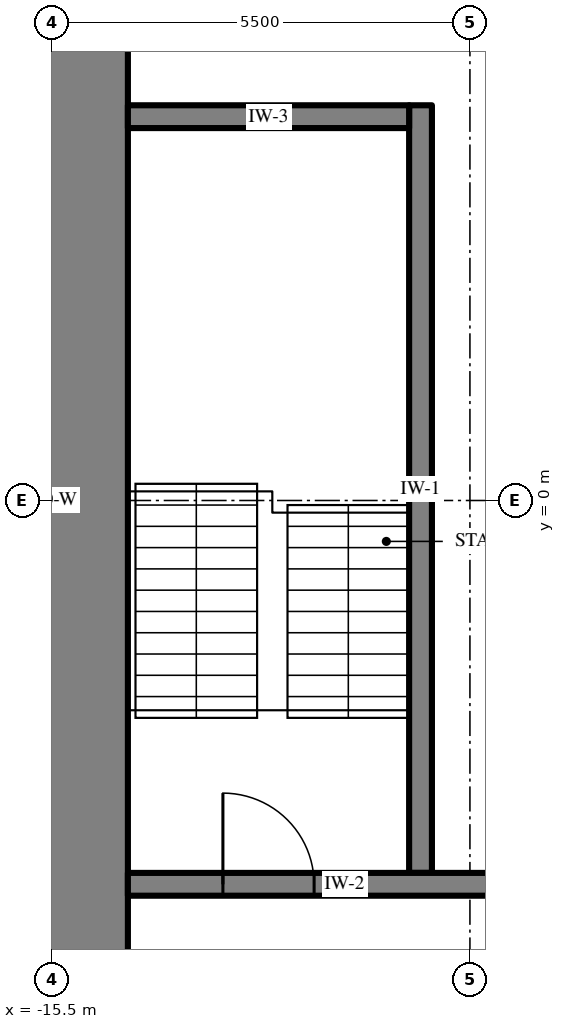
"""IFC4 building model, lengths in metres.
Left out: names, types, materials, properties, quantities, classifications, styles, units other than length and angle.
Written with IfcOpenShell. Run it as: python <this file> out.ifc"""

import sys

from ifc_helpers import new_model, si_unit, direction, frame, frame_2d, origin, place, context, subcontext, project, spatial, rectangle, extrude, element, fill, save


model = new_model("IFC4")
c1 = context("Model", 3, precision=1e-05, world=origin(), true_north=direction((0.0, 1.0)))
c2 = subcontext(c1, "Body", "Model", "MODEL_VIEW")
j1 = project(units=[si_unit("LENGTHUNIT", "METRE"), si_unit("PLANEANGLEUNIT", "RADIAN")], contexts=[c1])
p1 = place(None, origin())
s1 = spatial("IfcSite", under=j1, at=p1, CompositionType="ELEMENT")
p2 = place(p1, origin())
s2 = spatial("IfcBuilding", under=s1, at=p2, CompositionType="ELEMENT")
p3 = place(p2, frame((0.0, 0.0, 21.0)))
s3 = spatial("IfcBuildingStorey", under=s2, at=p3, CompositionType="ELEMENT", Elevation=21.0)
p4 = place(p3, frame((-15.5, -15.5, -0.25), z_axis=(0.0, 0.0, 1.0), x_axis=(0.0, 1.0, 0.0)))
e1 = element("IfcWall", 1, at=p4, inside=s3, PredefinedType="SHEAR", context=c2, shape_type="SweptSolid", body=[
    extrude(rectangle(XDim=31.0, YDim=2.0, at=frame_2d((15.5, 0.0))), origin(), (0.0, 0.0, 1.0), 3.75),
])
p5 = place(p4, frame((6.5, 0.0, 0.25)))
e2 = element("IfcOpeningElement", 2, at=p5, cuts=e1, PredefinedType="OPENING", context=c2, shape_type="SweptSolid", body=[
    extrude(rectangle(XDim=1.2, YDim=2.1, at=frame_2d((0.6, 1.05))), frame((0.0, 1.01, 0.0), z_axis=(0.0, -1.0, 0.0), x_axis=(1.0, 0.0, 0.0)), (0.0, 0.0, 1.0), 2.02),
])
p6 = place(p4, frame((23.0, 0.0, 0.25)))
e3 = element("IfcOpeningElement", 3, at=p6, cuts=e1, PredefinedType="OPENING", context=c2, shape_type="SweptSolid", body=[
    extrude(rectangle(XDim=1.8, YDim=2.1, at=frame_2d((0.9, 1.05))), frame((0.0, 1.01, 0.0), z_axis=(0.0, -1.0, 0.0), x_axis=(1.0, 0.0, 0.0)), (0.0, 0.0, 1.0), 2.02),
])
p7 = place(p3, frame((-10.65, -4.9, 0.0), z_axis=(0.0, 0.0, 1.0), x_axis=(0.0, 1.0, 0.0)))
e4 = element("IfcWall", 4, at=p7, inside=s3, PredefinedType="SOLIDWALL", context=c2, shape_type="SweptSolid", body=[
    extrude(rectangle(XDim=10.1, YDim=0.3, at=frame_2d((5.05, 0.0))), origin(), (0.0, 0.0, 1.0), 3.5),
])
p8 = place(p3, frame((-14.5, -5.05, 0.0), z_axis=(0.0, 0.0, 1.0), x_axis=(1.0, 0.0, 0.0)))
e5 = element("IfcWall", 5, at=p8, inside=s3, PredefinedType="SOLIDWALL", context=c2, shape_type="SweptSolid", body=[
    extrude(rectangle(XDim=5.7, YDim=0.3, at=frame_2d((2.85, 0.0))), origin(), (0.0, 0.0, 1.0), 3.5),
])
p9 = place(p8, frame((1.25, 0.0, 0.0)))
e6 = element("IfcOpeningElement", 6, at=p9, cuts=e5, PredefinedType="OPENING", context=c2, shape_type="SweptSolid", body=[
    extrude(rectangle(XDim=1.2, YDim=2.1, at=frame_2d((0.6, 1.05))), frame((0.0, 0.16, 0.0), z_axis=(0.0, -1.0, 0.0), x_axis=(1.0, 0.0, 0.0)), (0.0, 0.0, 1.0), 0.32),
])
p10 = place(p3, frame((-14.5, 5.05, 0.0), z_axis=(0.0, 0.0, 1.0), x_axis=(1.0, 0.0, 0.0)))
e7 = element("IfcWall", 7, at=p10, inside=s3, PredefinedType="SOLIDWALL", context=c2, shape_type="SweptSolid", body=[
    extrude(rectangle(XDim=3.7, YDim=0.3, at=frame_2d((1.85, 0.0))), origin(), (0.0, 0.0, 1.0), 3.5),
])
p11 = place(p3, frame((-10.65, 2.0, 0.0), z_axis=(0.0, 0.0, 1.0), x_axis=(1.0, 0.0, 0.0)))
e8 = element("IfcWall", 8, at=p11, inside=s3, PredefinedType="PARTITIONING", context=c2, shape_type="SweptSolid", body=[
    extrude(rectangle(XDim=21.3, YDim=0.3, at=frame_2d((10.65, 0.0))), origin(), (0.0, 0.0, 1.0), 3.5),
])
p12 = place(p11, frame((10.05, 0.0, 0.0)))
e9 = element("IfcOpeningElement", 9, at=p12, cuts=e8, PredefinedType="OPENING", context=c2, shape_type="SweptSolid", body=[
    extrude(rectangle(XDim=1.2, YDim=2.1, at=frame_2d((0.6, 1.05))), frame((0.0, 0.16, 0.0), z_axis=(0.0, -1.0, 0.0), x_axis=(1.0, 0.0, 0.0)), (0.0, 0.0, 1.0), 0.32),
])
p13 = place(p11, frame((18.942, 0.0, 0.0)))
e10 = element("IfcOpeningElement", 10, at=p13, cuts=e8, PredefinedType="OPENING", context=c2, shape_type="SweptSolid", body=[
    extrude(rectangle(XDim=0.9, YDim=2.1, at=frame_2d((0.45, 1.05))), frame((0.0, 0.16, 0.0), z_axis=(0.0, -1.0, 0.0), x_axis=(1.0, 0.0, 0.0)), (0.0, 0.0, 1.0), 0.32),
])
p14 = place(p3, frame((-10.65, -2.25, 0.0), z_axis=(0.0, 0.0, 1.0), x_axis=(1.0, 0.0, 0.0)))
e11 = element("IfcWall", 11, at=p14, inside=s3, PredefinedType="PARTITIONING", context=c2, shape_type="SweptSolid", body=[
    extrude(rectangle(XDim=7.35, YDim=0.3, at=frame_2d((3.675, 0.0))), origin(), (0.0, 0.0, 1.0), 3.5),
])
p15 = place(p9, origin())
e12 = element("IfcDoor", 12, at=p15, inside=s3, OperationType="SINGLE_SWING_LEFT", PredefinedType="DOOR", context=c2, shape_type="SweptSolid", body=[
    extrude(rectangle(XDim=1.2, YDim=2.1, at=frame_2d((0.6, 1.05))), frame((0.0, 0.025, 0.0), z_axis=(0.0, -1.0, 0.0), x_axis=(1.0, 0.0, 0.0)), (0.0, 0.0, 1.0), 0.05),
])
fill(e6, e12)
save(model, sys.argv[1])
